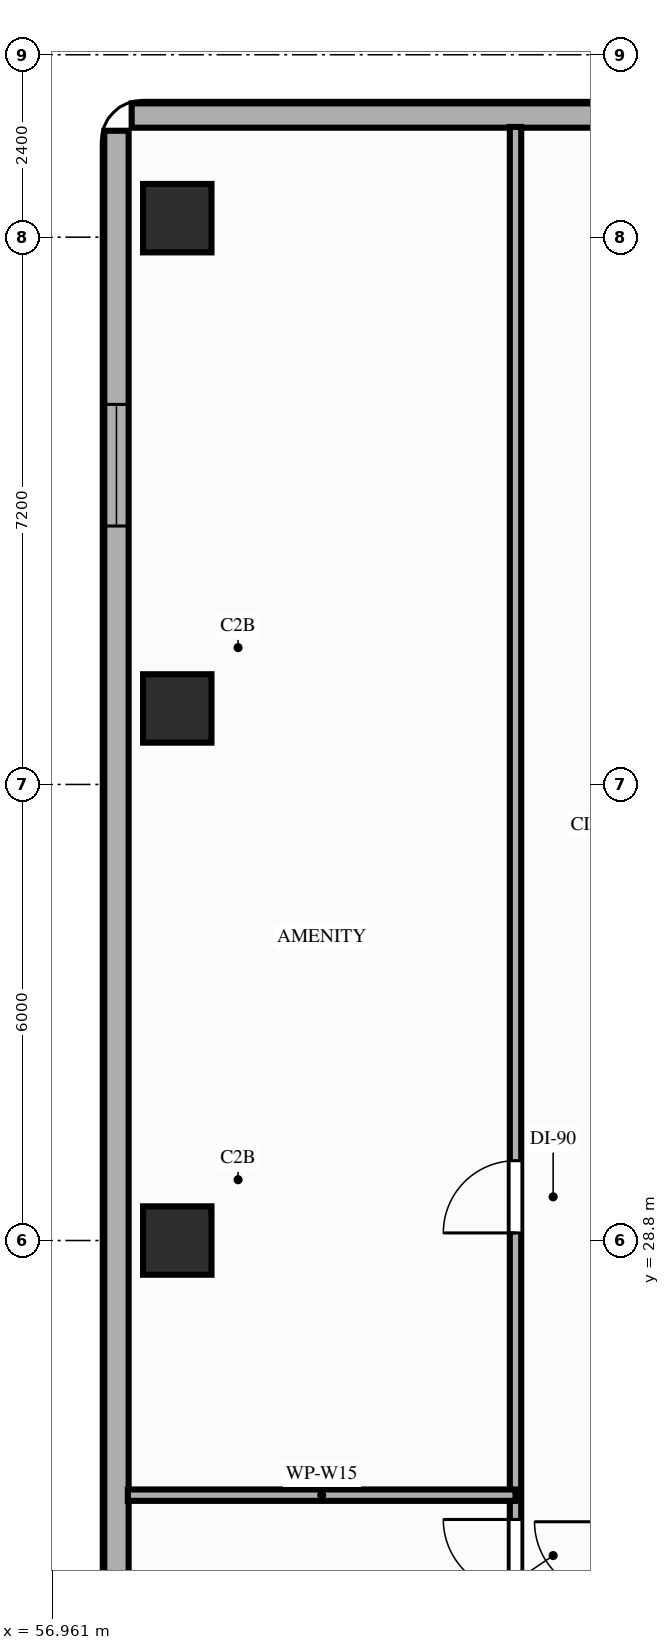
"""IFC4 building model, lengths in metres.
Left out: names, types, materials, properties, quantities, classifications, styles, units other than length and angle.
Written with IfcOpenShell. Run it as: python <this file> out.ifc"""

import sys

from ifc_helpers import new_model, si_unit, direction, frame, frame_2d, origin, origin_2d, place, context, subcontext, project, spatial, rectangle, extrude, element, fill, save


model = new_model("IFC4")
c1 = context("Model", 3, precision=1e-05, world=origin(), true_north=direction((0.0, 1.0)))
c2 = subcontext(c1, "Body", "Model", "MODEL_VIEW")
j1 = project(units=[si_unit("LENGTHUNIT", "METRE"), si_unit("PLANEANGLEUNIT", "RADIAN")], contexts=[c1])
p1 = place(None, origin())
s1 = spatial("IfcSite", under=j1, at=p1, CompositionType="ELEMENT")
p2 = place(p1, origin())
s2 = spatial("IfcBuilding", under=s1, at=p2, CompositionType="ELEMENT")
p3 = place(p2, frame((0.0, 0.0, 62.8)))
s3 = spatial("IfcBuildingStorey", under=s2, at=p3, CompositionType="ELEMENT", Elevation=62.8)
for number, where, z_axis, x_axis in (
    (1, (58.6, 28.8, 0.0), (0.0, 0.0, 1.0), (1.0, 0.0, 0.0)),
    (2, (58.6, 35.8, 0.0), (0.0, 0.0, 1.0), (1.0, 0.0, 0.0)),
    (3, (58.6, 42.25, 0.0), (0.0, 0.0, 1.0), (1.0, 0.0, 0.0)),
):
    element("IfcColumn", number, at=place(p3, frame(where, z_axis=z_axis, x_axis=x_axis)), inside=s3, PredefinedType="COLUMN", context=c2, shape_type="SweptSolid", body=[
        extrude(rectangle(XDim=0.9, YDim=0.9, at=origin_2d()), origin(), (0.0, 0.0, 1.0), 3.2),
    ])
p4 = place(p3, frame((57.8, 43.4, 0.0), z_axis=(0.0, 0.0, 1.0), x_axis=(0.0, -1.0, 0.0)))
e4 = element("IfcWall", 4, at=p4, inside=s3, PredefinedType="STANDARD", context=c2, shape_type="SweptSolid", body=[
    extrude(rectangle(XDim=22.6, YDim=0.32, at=frame_2d((11.3, 0.0))), origin(), (0.0, 0.0, 1.0), 2.5),
])
p5 = place(p4, frame((3.6, 0.0, 0.85)))
e5 = element("IfcOpeningElement", 5, at=p5, cuts=e4, PredefinedType="OPENING", context=c2, shape_type="SweptSolid", body=[
    extrude(rectangle(XDim=1.6, YDim=1.35, at=frame_2d((0.8, 0.675))), frame((0.0, 0.17, 0.0), z_axis=(0.0, -1.0, 0.0), x_axis=(1.0, 0.0, 0.0)), (0.0, 0.0, 1.0), 0.34),
])
p6 = place(p3, frame((72.8, 43.6, 0.0), z_axis=(0.0, 0.0, 1.0), x_axis=(-1.0, 0.0, 0.0)))
e6 = element("IfcWall", 6, at=p6, inside=s3, PredefinedType="STANDARD", context=c2, shape_type="SweptSolid", body=[
    extrude(rectangle(XDim=14.8, YDim=0.32, at=frame_2d((7.4, 0.0))), origin(), (0.0, 0.0, 1.0), 3.02),
])
p7 = place(p3, frame((63.05, 20.75, 0.0), z_axis=(0.0, 0.0, 1.0), x_axis=(0.0, 1.0, 0.0)))
e7 = element("IfcWall", 7, at=p7, inside=s3, PredefinedType="PARTITIONING", context=c2, shape_type="SweptSolid", body=[
    extrude(rectangle(XDim=22.7, YDim=0.15, at=frame_2d((11.35, 0.0))), origin(), (0.0, 0.0, 1.0), 2.5),
])
p8 = place(p7, frame((0.73, 0.0, 0.0)))
e8 = element("IfcOpeningElement", 8, at=p8, cuts=e7, PredefinedType="OPENING", context=c2, shape_type="SweptSolid", body=[
    extrude(rectangle(XDim=0.85, YDim=2.1, at=frame_2d((0.425, 1.05))), frame((0.0, 0.085, 0.0), z_axis=(0.0, -1.0, 0.0), x_axis=(1.0, 0.0, 0.0)), (0.0, 0.0, 1.0), 0.17),
])
p9 = place(p7, frame((3.43, 0.0, 0.0)))
e9 = element("IfcOpeningElement", 9, at=p9, cuts=e7, PredefinedType="OPENING", context=c2, shape_type="SweptSolid", body=[
    extrude(rectangle(XDim=0.95, YDim=2.1, at=frame_2d((0.475, 1.05))), frame((0.0, 0.085, 0.0), z_axis=(0.0, -1.0, 0.0), x_axis=(1.0, 0.0, 0.0)), (0.0, 0.0, 1.0), 0.17),
])
p10 = place(p7, frame((8.15, 0.0, 0.0)))
e10 = element("IfcOpeningElement", 10, at=p10, cuts=e7, PredefinedType="OPENING", context=c2, shape_type="SweptSolid", body=[
    extrude(rectangle(XDim=0.95, YDim=2.15, at=frame_2d((0.475, 1.075))), frame((0.0, 0.085, 0.0), z_axis=(0.0, -1.0, 0.0), x_axis=(1.0, 0.0, 0.0)), (0.0, 0.0, 1.0), 0.17),
])
p11 = place(p3, frame((57.95, 25.45, 0.0), z_axis=(0.0, 0.0, 1.0), x_axis=(1.0, 0.0, 0.0)))
e11 = element("IfcWall", 11, at=p11, inside=s3, PredefinedType="PARTITIONING", context=c2, shape_type="SweptSolid", body=[
    extrude(rectangle(XDim=5.1, YDim=0.15, at=frame_2d((2.55, 0.0))), origin(), (0.0, 0.0, 1.0), 2.5),
])
p12 = place(p5, origin())
e12 = element("IfcWindow", 12, at=p12, inside=s3, PartitioningType="SINGLE_PANEL", PredefinedType="WINDOW", context=c2, shape_type="SweptSolid", body=[
    extrude(rectangle(XDim=1.6, YDim=1.35, at=frame_2d((0.8, 0.675))), frame((0.0, 0.03, 0.0), z_axis=(0.0, -1.0, 0.0), x_axis=(1.0, 0.0, 0.0)), (0.0, 0.0, 1.0), 0.06),
])
fill(e5, e12)
p13 = place(p9, origin())
e13 = element("IfcDoor", 13, at=p13, inside=s3, OperationType="SINGLE_SWING_RIGHT", PredefinedType="DOOR", context=c2, shape_type="SweptSolid", body=[
    extrude(rectangle(XDim=0.95, YDim=2.1, at=frame_2d((0.475, 1.05))), frame((0.0, 0.025, 0.0), z_axis=(0.0, -1.0, 0.0), x_axis=(1.0, 0.0, 0.0)), (0.0, 0.0, 1.0), 0.05),
])
fill(e9, e13)
p14 = place(p10, origin())
e14 = element("IfcDoor", 14, at=p14, inside=s3, OperationType="SINGLE_SWING_LEFT", PredefinedType="DOOR", context=c2, shape_type="SweptSolid", body=[
    extrude(rectangle(XDim=0.95, YDim=2.15, at=frame_2d((0.475, 1.075))), frame((0.0, 0.025, 0.0), z_axis=(0.0, -1.0, 0.0), x_axis=(1.0, 0.0, 0.0)), (0.0, 0.0, 1.0), 0.05),
])
fill(e10, e14)
save(model, sys.argv[1])
